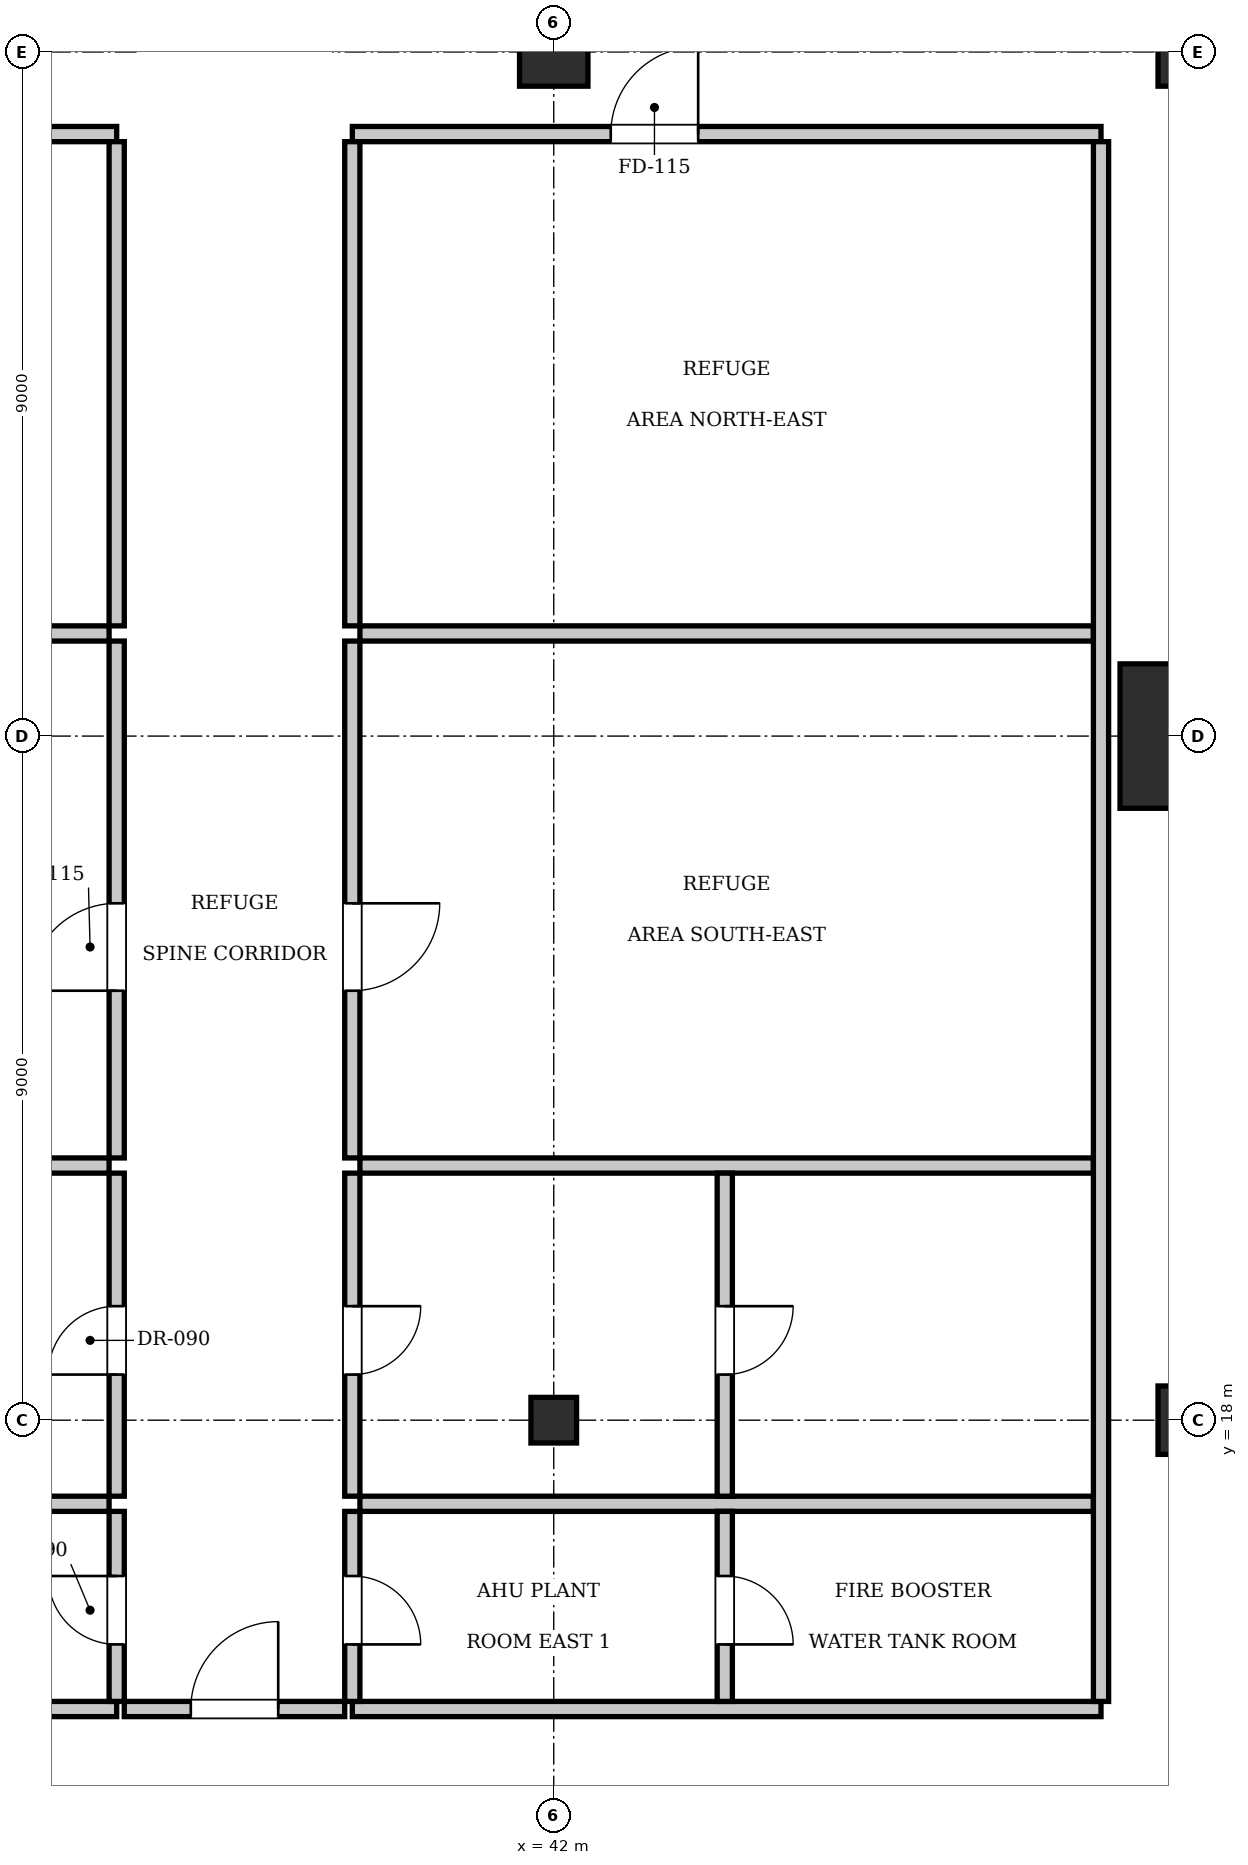
"""IFC4 building model, lengths in metres.
Left out: names, types, materials, properties, quantities, classifications, styles, units other than length and angle.
Written with IfcOpenShell. Run it as: python <this file> out.ifc"""

import sys

from ifc_helpers import new_model, si_unit, direction, frame, frame_2d, origin, origin_2d, place, context, subcontext, project, spatial, rectangle, i_section, extrude, element, fill, save


model = new_model("IFC4")
c1 = context("Model", 3, precision=1e-05, world=origin(), true_north=direction((0.0, 1.0)))
c2 = subcontext(c1, "Body", "Model", "MODEL_VIEW")
j1 = project(units=[si_unit("LENGTHUNIT", "METRE"), si_unit("PLANEANGLEUNIT", "RADIAN")], contexts=[c1])
p1 = place(None, origin())
s1 = spatial("IfcSite", under=j1, at=p1, CompositionType="ELEMENT")
p2 = place(p1, origin())
s2 = spatial("IfcBuilding", under=s1, at=p2, CompositionType="ELEMENT")
p3 = place(p2, frame((0.0, 0.0, 227.5)))
s3 = spatial("IfcBuildingStorey", under=s2, at=p3, CompositionType="ELEMENT", Elevation=227.5)
p4 = place(p3, frame((50.4, 27.0, 0.0), z_axis=(0.0, 0.0, 1.0), x_axis=(1.0, 0.0, 0.0)))
e1 = element("IfcColumn", 1, at=p4, inside=s3, PredefinedType="COLUMN", context=c2, shape_type="SweptSolid", body=[
    extrude(rectangle(XDim=1.9, YDim=1.9, at=origin_2d()), origin(), (0.0, 0.0, 1.0), 7.0),
])
for number, where, z_axis, x_axis in (
    (2, (42.0, 36.0, 0.0), (0.0, 0.0, 1.0), (1.0, 0.0, 0.0)),
    (3, (50.4, 36.0, 0.0), (0.0, 0.0, 1.0), (1.0, 0.0, 0.0)),
    (4, (50.4, 18.0, 0.0), (0.0, 0.0, 1.0), (1.0, 0.0, 0.0)),
):
    element("IfcColumn", number, at=place(p3, frame(where, z_axis=z_axis, x_axis=x_axis)), inside=s3, PredefinedType="COLUMN", context=c2, shape_type="SweptSolid", body=[
        extrude(rectangle(XDim=0.9, YDim=0.9, at=origin_2d()), origin(), (0.0, 0.0, 1.0), 7.0),
    ])
p5 = place(p3, frame((42.0, 18.0, 0.0), z_axis=(0.0, 0.0, 1.0), x_axis=(1.0, 0.0, 0.0)))
e5 = element("IfcColumn", 5, at=p5, inside=s3, PredefinedType="COLUMN", context=c2, shape_type="SweptSolid", body=[
    extrude(i_section(OverallWidth=0.6, OverallDepth=0.6, WebThickness=0.025, FlangeThickness=0.038, at=origin_2d()), origin(), (0.0, 0.0, 1.0), 7.0),
])
p6 = place(p3, frame((26.4, 34.92, 0.0), z_axis=(0.0, 0.0, 1.0), x_axis=(1.0, 0.0, 0.0)))
e6 = element("IfcWall", 6, at=p6, inside=s3, PredefinedType="PARTITIONING", context=c2, shape_type="SweptSolid", body=[
    extrude(rectangle(XDim=9.85, YDim=0.2, at=frame_2d((4.925, 0.0))), origin(), (0.0, 0.0, 1.0), 6.76),
])
p7 = place(p6, frame((2.2, 0.0, 0.0)))
e7 = element("IfcOpeningElement", 7, at=p7, cuts=e6, PredefinedType="OPENING", context=c2, shape_type="SweptSolid", body=[
    extrude(rectangle(XDim=1.15, YDim=2.15, at=frame_2d((0.575, 1.075))), frame((0.0, 0.11, 0.0), z_axis=(0.0, -1.0, 0.0), x_axis=(1.0, 0.0, 0.0)), (0.0, 0.0, 1.0), 0.22),
])
for number, where, z_axis, x_axis in (
    (8, (26.5, 28.35, 0.0), (0.0, 0.0, 1.0), (1.0, 0.0, 0.0)),
    (9, (26.5, 21.35, 0.0), (0.0, 0.0, 1.0), (1.0, 0.0, 0.0)),
    (10, (26.5, 16.9, 0.0), (0.0, 0.0, 1.0), (1.0, 0.0, 0.0)),
):
    element("IfcWall", number, at=place(p3, frame(where, z_axis=z_axis, x_axis=x_axis)), inside=s3, PredefinedType="PARTITIONING", context=c2, shape_type="SweptSolid", body=[
        extrude(rectangle(XDim=9.65, YDim=0.2, at=frame_2d((4.825, 0.0))), origin(), (0.0, 0.0, 1.0), 6.76),
    ])
p8 = place(p3, frame((26.4, 14.2, 0.0), z_axis=(0.0, 0.0, 1.0), x_axis=(1.0, 0.0, 0.0)))
e11 = element("IfcWall", 11, at=p8, inside=s3, PredefinedType="PARTITIONING", context=c2, shape_type="SweptSolid", body=[
    extrude(rectangle(XDim=9.85, YDim=0.2, at=frame_2d((4.925, 0.0))), origin(), (0.0, 0.0, 1.0), 6.76),
])
p9 = place(p3, frame((36.25, 28.45, 0.0), z_axis=(0.0, 0.0, 1.0), x_axis=(0.0, 1.0, 0.0)))
e12 = element("IfcWall", 12, at=p9, inside=s3, PredefinedType="PARTITIONING", context=c2, shape_type="SweptSolid", body=[
    extrude(rectangle(XDim=6.37, YDim=0.2, at=frame_2d((3.185, 0.0))), origin(), (0.0, 0.0, 1.0), 6.76),
])
p10 = place(p3, frame((36.25, 21.45, 0.0), z_axis=(0.0, 0.0, 1.0), x_axis=(0.0, 1.0, 0.0)))
e13 = element("IfcWall", 13, at=p10, inside=s3, PredefinedType="PARTITIONING", context=c2, shape_type="SweptSolid", body=[
    extrude(rectangle(XDim=6.8, YDim=0.2, at=frame_2d((3.4, 0.0))), origin(), (0.0, 0.0, 1.0), 6.76),
])
p11 = place(p10, frame((2.2, 0.0, 0.0)))
e14 = element("IfcOpeningElement", 14, at=p11, cuts=e13, PredefinedType="OPENING", context=c2, shape_type="SweptSolid", body=[
    extrude(rectangle(XDim=1.15, YDim=2.15, at=frame_2d((0.575, 1.075))), frame((0.0, 0.11, 0.0), z_axis=(0.0, -1.0, 0.0), x_axis=(1.0, 0.0, 0.0)), (0.0, 0.0, 1.0), 0.22),
])
p12 = place(p3, frame((36.25, 17.0, 0.0), z_axis=(0.0, 0.0, 1.0), x_axis=(0.0, 1.0, 0.0)))
e15 = element("IfcWall", 15, at=p12, inside=s3, PredefinedType="PARTITIONING", context=c2, shape_type="SweptSolid", body=[
    extrude(rectangle(XDim=4.25, YDim=0.2, at=frame_2d((2.125, 0.0))), origin(), (0.0, 0.0, 1.0), 6.76),
])
p13 = place(p12, frame((1.6, 0.0, 0.0)))
e16 = element("IfcOpeningElement", 16, at=p13, cuts=e15, PredefinedType="OPENING", context=c2, shape_type="SweptSolid", body=[
    extrude(rectangle(XDim=0.9, YDim=2.1, at=frame_2d((0.45, 1.05))), frame((0.0, 0.11, 0.0), z_axis=(0.0, -1.0, 0.0), x_axis=(1.0, 0.0, 0.0)), (0.0, 0.0, 1.0), 0.22),
])
p14 = place(p3, frame((36.25, 14.3, 0.0), z_axis=(0.0, 0.0, 1.0), x_axis=(0.0, 1.0, 0.0)))
e17 = element("IfcWall", 17, at=p14, inside=s3, PredefinedType="PARTITIONING", context=c2, shape_type="SweptSolid", body=[
    extrude(rectangle(XDim=2.5, YDim=0.2, at=frame_2d((1.25, 0.0))), origin(), (0.0, 0.0, 1.0), 6.76),
])
p15 = place(p14, frame((0.75, 0.0, 0.0)))
e18 = element("IfcOpeningElement", 18, at=p15, cuts=e17, PredefinedType="OPENING", context=c2, shape_type="SweptSolid", body=[
    extrude(rectangle(XDim=0.9, YDim=2.1, at=frame_2d((0.45, 1.05))), frame((0.0, 0.11, 0.0), z_axis=(0.0, -1.0, 0.0), x_axis=(1.0, 0.0, 0.0)), (0.0, 0.0, 1.0), 0.22),
])
p16 = place(p3, frame((39.35, 34.92, 0.0), z_axis=(0.0, 0.0, 1.0), x_axis=(1.0, 0.0, 0.0)))
e19 = element("IfcWall", 19, at=p16, inside=s3, PredefinedType="PARTITIONING", context=c2, shape_type="SweptSolid", body=[
    extrude(rectangle(XDim=9.85, YDim=0.2, at=frame_2d((4.925, 0.0))), origin(), (0.0, 0.0, 1.0), 6.76),
])
p17 = place(p16, frame((3.4, 0.0, 0.0)))
e20 = element("IfcOpeningElement", 20, at=p17, cuts=e19, PredefinedType="OPENING", context=c2, shape_type="SweptSolid", body=[
    extrude(rectangle(XDim=1.15, YDim=2.15, at=frame_2d((0.575, 1.075))), frame((0.0, 0.11, 0.0), z_axis=(0.0, -1.0, 0.0), x_axis=(1.0, 0.0, 0.0)), (0.0, 0.0, 1.0), 0.22),
])
for number, where, z_axis, x_axis in (
    (21, (39.45, 28.35, 0.0), (0.0, 0.0, 1.0), (1.0, 0.0, 0.0)),
    (22, (39.45, 21.35, 0.0), (0.0, 0.0, 1.0), (1.0, 0.0, 0.0)),
    (23, (39.45, 16.9, 0.0), (0.0, 0.0, 1.0), (1.0, 0.0, 0.0)),
):
    element("IfcWall", number, at=place(p3, frame(where, z_axis=z_axis, x_axis=x_axis)), inside=s3, PredefinedType="PARTITIONING", context=c2, shape_type="SweptSolid", body=[
        extrude(rectangle(XDim=9.65, YDim=0.2, at=frame_2d((4.825, 0.0))), origin(), (0.0, 0.0, 1.0), 6.76),
    ])
p18 = place(p3, frame((39.35, 14.2, 0.0), z_axis=(0.0, 0.0, 1.0), x_axis=(1.0, 0.0, 0.0)))
e24 = element("IfcWall", 24, at=p18, inside=s3, PredefinedType="PARTITIONING", context=c2, shape_type="SweptSolid", body=[
    extrude(rectangle(XDim=9.85, YDim=0.2, at=frame_2d((4.925, 0.0))), origin(), (0.0, 0.0, 1.0), 6.76),
])
p19 = place(p3, frame((49.2, 14.3, 0.0), z_axis=(0.0, 0.0, 1.0), x_axis=(0.0, 1.0, 0.0)))
e25 = element("IfcWall", 25, at=p19, inside=s3, PredefinedType="PARTITIONING", context=c2, shape_type="SweptSolid", body=[
    extrude(rectangle(XDim=20.52, YDim=0.2, at=frame_2d((10.26, 0.0))), origin(), (0.0, 0.0, 1.0), 6.76),
])
p20 = place(p3, frame((39.35, 28.45, 0.0), z_axis=(0.0, 0.0, 1.0), x_axis=(0.0, 1.0, 0.0)))
e26 = element("IfcWall", 26, at=p20, inside=s3, PredefinedType="PARTITIONING", context=c2, shape_type="SweptSolid", body=[
    extrude(rectangle(XDim=6.37, YDim=0.2, at=frame_2d((3.185, 0.0))), origin(), (0.0, 0.0, 1.0), 6.76),
])
p21 = place(p3, frame((39.35, 21.45, 0.0), z_axis=(0.0, 0.0, 1.0), x_axis=(0.0, 1.0, 0.0)))
e27 = element("IfcWall", 27, at=p21, inside=s3, PredefinedType="PARTITIONING", context=c2, shape_type="SweptSolid", body=[
    extrude(rectangle(XDim=6.8, YDim=0.2, at=frame_2d((3.4, 0.0))), origin(), (0.0, 0.0, 1.0), 6.76),
])
p22 = place(p21, frame((2.2, 0.0, 0.0)))
e28 = element("IfcOpeningElement", 28, at=p22, cuts=e27, PredefinedType="OPENING", context=c2, shape_type="SweptSolid", body=[
    extrude(rectangle(XDim=1.15, YDim=2.15, at=frame_2d((0.575, 1.075))), frame((0.0, 0.11, 0.0), z_axis=(0.0, -1.0, 0.0), x_axis=(1.0, 0.0, 0.0)), (0.0, 0.0, 1.0), 0.22),
])
p23 = place(p3, frame((39.35, 17.0, 0.0), z_axis=(0.0, 0.0, 1.0), x_axis=(0.0, 1.0, 0.0)))
e29 = element("IfcWall", 29, at=p23, inside=s3, PredefinedType="PARTITIONING", context=c2, shape_type="SweptSolid", body=[
    extrude(rectangle(XDim=4.25, YDim=0.2, at=frame_2d((2.125, 0.0))), origin(), (0.0, 0.0, 1.0), 6.76),
])
p24 = place(p23, frame((1.6, 0.0, 0.0)))
e30 = element("IfcOpeningElement", 30, at=p24, cuts=e29, PredefinedType="OPENING", context=c2, shape_type="SweptSolid", body=[
    extrude(rectangle(XDim=0.9, YDim=2.1, at=frame_2d((0.45, 1.05))), frame((0.0, 0.11, 0.0), z_axis=(0.0, -1.0, 0.0), x_axis=(1.0, 0.0, 0.0)), (0.0, 0.0, 1.0), 0.22),
])
p25 = place(p3, frame((39.35, 14.3, 0.0), z_axis=(0.0, 0.0, 1.0), x_axis=(0.0, 1.0, 0.0)))
e31 = element("IfcWall", 31, at=p25, inside=s3, PredefinedType="PARTITIONING", context=c2, shape_type="SweptSolid", body=[
    extrude(rectangle(XDim=2.5, YDim=0.2, at=frame_2d((1.25, 0.0))), origin(), (0.0, 0.0, 1.0), 6.76),
])
p26 = place(p25, frame((0.75, 0.0, 0.0)))
e32 = element("IfcOpeningElement", 32, at=p26, cuts=e31, PredefinedType="OPENING", context=c2, shape_type="SweptSolid", body=[
    extrude(rectangle(XDim=0.9, YDim=2.1, at=frame_2d((0.45, 1.05))), frame((0.0, 0.11, 0.0), z_axis=(0.0, -1.0, 0.0), x_axis=(1.0, 0.0, 0.0)), (0.0, 0.0, 1.0), 0.22),
])
p27 = place(p3, frame((44.25, 14.3, 0.0), z_axis=(0.0, 0.0, 1.0), x_axis=(0.0, 1.0, 0.0)))
e33 = element("IfcWall", 33, at=p27, inside=s3, PredefinedType="PARTITIONING", context=c2, shape_type="SweptSolid", body=[
    extrude(rectangle(XDim=2.5, YDim=0.2, at=frame_2d((1.25, 0.0))), origin(), (0.0, 0.0, 1.0), 6.76),
])
p28 = place(p27, frame((0.75, 0.0, 0.0)))
e34 = element("IfcOpeningElement", 34, at=p28, cuts=e33, PredefinedType="OPENING", context=c2, shape_type="SweptSolid", body=[
    extrude(rectangle(XDim=0.9, YDim=2.1, at=frame_2d((0.45, 1.05))), frame((0.0, 0.11, 0.0), z_axis=(0.0, -1.0, 0.0), x_axis=(1.0, 0.0, 0.0)), (0.0, 0.0, 1.0), 0.22),
])
p29 = place(p3, frame((44.25, 17.0, 0.0), z_axis=(0.0, 0.0, 1.0), x_axis=(0.0, 1.0, 0.0)))
e35 = element("IfcWall", 35, at=p29, inside=s3, PredefinedType="PARTITIONING", context=c2, shape_type="SweptSolid", body=[
    extrude(rectangle(XDim=4.25, YDim=0.2, at=frame_2d((2.125, 0.0))), origin(), (0.0, 0.0, 1.0), 6.76),
])
p30 = place(p29, frame((1.6, 0.0, 0.0)))
e36 = element("IfcOpeningElement", 36, at=p30, cuts=e35, PredefinedType="OPENING", context=c2, shape_type="SweptSolid", body=[
    extrude(rectangle(XDim=0.9, YDim=2.1, at=frame_2d((0.45, 1.05))), frame((0.0, 0.11, 0.0), z_axis=(0.0, -1.0, 0.0), x_axis=(1.0, 0.0, 0.0)), (0.0, 0.0, 1.0), 0.22),
])
p31 = place(p3, frame((36.35, 14.2, 0.0), z_axis=(0.0, 0.0, 1.0), x_axis=(1.0, 0.0, 0.0)))
e37 = element("IfcWall", 37, at=p31, inside=s3, PredefinedType="PARTITIONING", context=c2, shape_type="SweptSolid", body=[
    extrude(rectangle(XDim=2.9, YDim=0.2, at=frame_2d((1.45, 0.0))), origin(), (0.0, 0.0, 1.0), 6.76),
])
p32 = place(p31, frame((0.875, 0.0, 0.0)))
e38 = element("IfcOpeningElement", 38, at=p32, cuts=e37, PredefinedType="OPENING", context=c2, shape_type="SweptSolid", body=[
    extrude(rectangle(XDim=1.15, YDim=2.15, at=frame_2d((0.575, 1.075))), frame((0.0, 0.11, 0.0), z_axis=(0.0, -1.0, 0.0), x_axis=(1.0, 0.0, 0.0)), (0.0, 0.0, 1.0), 0.22),
])
p33 = place(p11, origin())
e39 = element("IfcDoor", 39, at=p33, inside=s3, OperationType="SINGLE_SWING_LEFT", PredefinedType="DOOR", context=c2, shape_type="SweptSolid", body=[
    extrude(rectangle(XDim=1.15, YDim=2.15, at=frame_2d((0.575, 1.075))), frame((0.0, 0.025, 0.0), z_axis=(0.0, -1.0, 0.0), x_axis=(1.0, 0.0, 0.0)), (0.0, 0.0, 1.0), 0.05),
])
fill(e14, e39)
p34 = place(p15, origin())
e40 = element("IfcDoor", 40, at=p34, inside=s3, OperationType="SINGLE_SWING_RIGHT", PredefinedType="DOOR", context=c2, shape_type="SweptSolid", body=[
    extrude(rectangle(XDim=0.9, YDim=2.1, at=frame_2d((0.45, 1.05))), frame((0.0, 0.025, 0.0), z_axis=(0.0, -1.0, 0.0), x_axis=(1.0, 0.0, 0.0)), (0.0, 0.0, 1.0), 0.05),
])
fill(e18, e40)
p35 = place(p13, origin())
e41 = element("IfcDoor", 41, at=p35, inside=s3, OperationType="SINGLE_SWING_LEFT", PredefinedType="DOOR", context=c2, shape_type="SweptSolid", body=[
    extrude(rectangle(XDim=0.9, YDim=2.1, at=frame_2d((0.45, 1.05))), frame((0.0, 0.025, 0.0), z_axis=(0.0, -1.0, 0.0), x_axis=(1.0, 0.0, 0.0)), (0.0, 0.0, 1.0), 0.05),
])
fill(e16, e41)
p36 = place(p17, origin())
e42 = element("IfcDoor", 42, at=p36, inside=s3, OperationType="SINGLE_SWING_RIGHT", PredefinedType="DOOR", context=c2, shape_type="SweptSolid", body=[
    extrude(rectangle(XDim=1.15, YDim=2.15, at=frame_2d((0.575, 1.075))), frame((0.0, 0.025, 0.0), z_axis=(0.0, -1.0, 0.0), x_axis=(1.0, 0.0, 0.0)), (0.0, 0.0, 1.0), 0.05),
])
fill(e20, e42)
p37 = place(p22, frame((1.15, 0.0, 0.0), z_axis=(0.0, 0.0, 1.0), x_axis=(-1.0, 0.0, 0.0)))
e43 = element("IfcDoor", 43, at=p37, inside=s3, OperationType="SINGLE_SWING_LEFT", PredefinedType="DOOR", context=c2, shape_type="SweptSolid", body=[
    extrude(rectangle(XDim=1.15, YDim=2.15, at=frame_2d((0.575, 1.075))), frame((0.0, 0.025, 0.0), z_axis=(0.0, -1.0, 0.0), x_axis=(1.0, 0.0, 0.0)), (0.0, 0.0, 1.0), 0.05),
])
fill(e28, e43)
p38 = place(p26, frame((0.9, 0.0, 0.0), z_axis=(0.0, 0.0, 1.0), x_axis=(-1.0, 0.0, 0.0)))
e44 = element("IfcDoor", 44, at=p38, inside=s3, OperationType="SINGLE_SWING_RIGHT", PredefinedType="DOOR", context=c2, shape_type="SweptSolid", body=[
    extrude(rectangle(XDim=0.9, YDim=2.1, at=frame_2d((0.45, 1.05))), frame((0.0, 0.025, 0.0), z_axis=(0.0, -1.0, 0.0), x_axis=(1.0, 0.0, 0.0)), (0.0, 0.0, 1.0), 0.05),
])
fill(e32, e44)
p39 = place(p24, frame((0.9, 0.0, 0.0), z_axis=(0.0, 0.0, 1.0), x_axis=(-1.0, 0.0, 0.0)))
e45 = element("IfcDoor", 45, at=p39, inside=s3, OperationType="SINGLE_SWING_LEFT", PredefinedType="DOOR", context=c2, shape_type="SweptSolid", body=[
    extrude(rectangle(XDim=0.9, YDim=2.1, at=frame_2d((0.45, 1.05))), frame((0.0, 0.025, 0.0), z_axis=(0.0, -1.0, 0.0), x_axis=(1.0, 0.0, 0.0)), (0.0, 0.0, 1.0), 0.05),
])
fill(e30, e45)
p40 = place(p28, frame((0.9, 0.0, 0.0), z_axis=(0.0, 0.0, 1.0), x_axis=(-1.0, 0.0, 0.0)))
e46 = element("IfcDoor", 46, at=p40, inside=s3, OperationType="SINGLE_SWING_RIGHT", PredefinedType="DOOR", context=c2, shape_type="SweptSolid", body=[
    extrude(rectangle(XDim=0.9, YDim=2.1, at=frame_2d((0.45, 1.05))), frame((0.0, 0.025, 0.0), z_axis=(0.0, -1.0, 0.0), x_axis=(1.0, 0.0, 0.0)), (0.0, 0.0, 1.0), 0.05),
])
fill(e34, e46)
p41 = place(p30, frame((0.9, 0.0, 0.0), z_axis=(0.0, 0.0, 1.0), x_axis=(-1.0, 0.0, 0.0)))
e47 = element("IfcDoor", 47, at=p41, inside=s3, OperationType="SINGLE_SWING_LEFT", PredefinedType="DOOR", context=c2, shape_type="SweptSolid", body=[
    extrude(rectangle(XDim=0.9, YDim=2.1, at=frame_2d((0.45, 1.05))), frame((0.0, 0.025, 0.0), z_axis=(0.0, -1.0, 0.0), x_axis=(1.0, 0.0, 0.0)), (0.0, 0.0, 1.0), 0.05),
])
fill(e36, e47)
p42 = place(p32, origin())
e48 = element("IfcDoor", 48, at=p42, inside=s3, OperationType="SINGLE_SWING_RIGHT", PredefinedType="DOOR", context=c2, shape_type="SweptSolid", body=[
    extrude(rectangle(XDim=1.15, YDim=2.15, at=frame_2d((0.575, 1.075))), frame((0.0, 0.025, 0.0), z_axis=(0.0, -1.0, 0.0), x_axis=(1.0, 0.0, 0.0)), (0.0, 0.0, 1.0), 0.05),
])
fill(e38, e48)
save(model, sys.argv[1])
